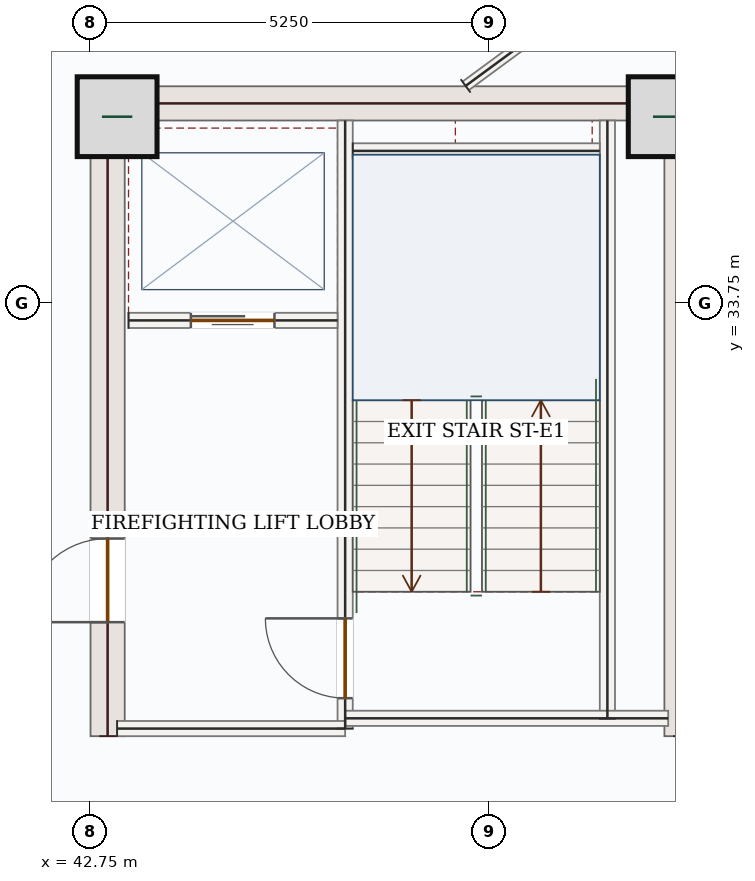
"""IFC4 building model, lengths in metres.
Left out: names, types, materials, properties, quantities, classifications, styles, units other than length and angle.
Written with IfcOpenShell. Run it as: python <this file> out.ifc"""

import sys

from ifc_helpers import new_model, si_unit, direction, frame, frame_2d, origin, origin_2d, place, context, subcontext, project, spatial, rectangle, extrude, source, transform, mapped, element, fill, save


model = new_model("IFC4")
c1 = context("Model", 3, precision=1e-05, world=origin(), true_north=direction((0.0, 1.0)))
c2 = subcontext(c1, "Body", "Model", "MODEL_VIEW")
j1 = project(units=[si_unit("LENGTHUNIT", "METRE"), si_unit("PLANEANGLEUNIT", "RADIAN")], contexts=[c1])
p1 = place(None, origin())
s1 = spatial("IfcSite", under=j1, at=p1, CompositionType="ELEMENT")
p2 = place(p1, origin())
s2 = spatial("IfcBuilding", under=s1, at=p2, CompositionType="ELEMENT")
p3 = place(p2, frame((0.0, 0.0, 276.6)))
s3 = spatial("IfcBuildingStorey", under=s2, at=p3, CompositionType="ELEMENT", Elevation=276.6)
p4 = place(p3, frame((42.975, 28.05, 0.0), z_axis=(0.0, 0.0, 1.0), x_axis=(0.0, 1.0, 0.0)))
e1 = element("IfcWall", 1, at=p4, inside=s3, PredefinedType="SHEAR", context=c2, shape_type="SweptSolid", body=[
    extrude(rectangle(XDim=8.55, YDim=0.45, at=frame_2d((4.275, 0.0))), origin(), (0.0, 0.0, 1.0), 3.5),
])
p5 = place(p4, frame((1.5, 0.0, 0.0)))
e2 = element("IfcOpeningElement", 2, at=p5, cuts=e1, PredefinedType="OPENING", context=c2, shape_type="SweptSolid", body=[
    extrude(rectangle(XDim=1.1, YDim=2.2, at=frame_2d((0.55, 1.1))), frame((0.0, 0.235, 0.0), z_axis=(0.0, -1.0, 0.0), x_axis=(1.0, 0.0, 0.0)), (0.0, 0.0, 1.0), 0.47),
])
m1 = source(origin(), c2, "Body", "SweptSolid", [
    extrude(rectangle(XDim=8.55, YDim=0.45, at=frame_2d((4.275, 0.0))), origin(), (0.0, 0.0, 1.0), 3.5),
])
p6 = place(p3, frame((50.525, 28.05, 0.0), z_axis=(0.0, 0.0, 1.0), x_axis=(0.0, 1.0, 0.0)))
e3 = element("IfcWall", 3, at=p6, inside=s3, PredefinedType="SHEAR", context=c2, shape_type="MappedRepresentation", body=[
    mapped(m1, transform((0.0, 0.0, 0.0), x_axis=(1.0, 0.0, 0.0), y_axis=(0.0, 1.0, 0.0), z_axis=(0.0, 0.0, 1.0), scale=1.0)),
])
m2 = source(origin(), c2, "Body", "SweptSolid", [
    extrude(rectangle(XDim=7.1, YDim=0.45, at=frame_2d((3.55, 0.0))), origin(), (0.0, 0.0, 1.0), 3.5),
])
p7 = place(p3, frame((43.2, 36.375, 0.0), z_axis=(0.0, 0.0, 1.0), x_axis=(1.0, 0.0, 0.0)))
e4 = element("IfcWall", 4, at=p7, inside=s3, PredefinedType="SHEAR", context=c2, shape_type="MappedRepresentation", body=[
    mapped(m2, transform((0.0, 0.0, 0.0), x_axis=(1.0, 0.0, 0.0), y_axis=(0.0, 1.0, 0.0), z_axis=(0.0, 0.0, 1.0), scale=1.0)),
])
m3 = source(origin(), c2, "Body", "SweptSolid", [
    extrude(rectangle(XDim=1.05, YDim=1.05, at=origin_2d()), origin(), (0.0, 0.0, 1.0), 3.75),
])
for number, where, z_axis, x_axis in (
    (5, (43.1, 36.2, 0.0), (0.0, 0.0, 1.0), (1.0, 0.0, 0.0)),
    (6, (50.35, 36.2, 0.0), (0.0, 0.0, 1.0), (1.0, 0.0, 0.0)),
):
    element("IfcColumn", number, at=place(p3, frame(where, z_axis=z_axis, x_axis=x_axis)), inside=s3, PredefinedType="COLUMN", context=c2, shape_type="MappedRepresentation", body=[
        mapped(m3, transform((0.0, 0.0, 0.0), x_axis=(1.0, 0.0, 0.0), y_axis=(0.0, 1.0, 0.0), z_axis=(0.0, 0.0, 1.0), scale=1.0)),
    ])
m4 = source(origin(), c2, "Body", "SweptSolid", [
    extrude(rectangle(XDim=7.87, YDim=0.2, at=frame_2d((3.935, 0.0))), origin(), (0.0, 0.0, 1.0), 3.5),
])
p8 = place(p3, frame((49.55, 28.28, 0.0), z_axis=(0.0, 0.0, 1.0), x_axis=(0.0, 1.0, 0.0)))
e7 = element("IfcWall", 7, at=p8, inside=s3, PredefinedType="SOLIDWALL", context=c2, shape_type="MappedRepresentation", body=[
    mapped(m4, transform((0.0, 0.0, 0.0), x_axis=(1.0, 0.0, 0.0), y_axis=(0.0, 1.0, 0.0), z_axis=(0.0, 0.0, 1.0), scale=1.0)),
])
p9 = place(p3, frame((46.1, 28.15, 0.0), z_axis=(0.0, 0.0, 1.0), x_axis=(0.0, 1.0, 0.0)))
e8 = element("IfcWall", 8, at=p9, inside=s3, PredefinedType="SOLIDWALL", context=c2, shape_type="SweptSolid", body=[
    extrude(rectangle(XDim=8.0, YDim=0.2, at=frame_2d((4.0, 0.0))), origin(), (0.0, 0.0, 1.0), 3.5),
])
p10 = place(p9, frame((0.4, 0.0, 0.0)))
e9 = element("IfcOpeningElement", 9, at=p10, cuts=e8, PredefinedType="OPENING", context=c2, shape_type="SweptSolid", body=[
    extrude(rectangle(XDim=1.05, YDim=2.15, at=frame_2d((0.525, 1.075))), frame((0.0, 0.11, 0.0), z_axis=(0.0, -1.0, 0.0), x_axis=(1.0, 0.0, 0.0)), (0.0, 0.0, 1.0), 0.22),
])
m5 = source(origin(), c2, "Body", "SweptSolid", [
    extrude(rectangle(XDim=3.0, YDim=0.2, at=frame_2d((1.5, 0.0))), origin(), (0.0, 0.0, 1.0), 3.5),
])
p11 = place(p3, frame((43.1, 28.15, 0.0), z_axis=(0.0, 0.0, 1.0), x_axis=(1.0, 0.0, 0.0)))
e10 = element("IfcWall", 10, at=p11, inside=s3, PredefinedType="SOLIDWALL", context=c2, shape_type="MappedRepresentation", body=[
    mapped(m5, transform((0.0, 0.0, 0.0), x_axis=(1.0, 0.0, 0.0), y_axis=(0.0, 1.0, 0.0), z_axis=(0.0, 0.0, 1.0), scale=1.0)),
])
m6 = source(origin(), c2, "Body", "SweptSolid", [
    extrude(rectangle(XDim=4.25, YDim=0.2, at=frame_2d((2.125, 0.0))), origin(), (0.0, 0.0, 1.0), 3.5),
])
p12 = place(p3, frame((46.1, 28.285, 0.0), z_axis=(0.0, 0.0, 1.0), x_axis=(1.0, 0.0, 0.0)))
e11 = element("IfcWall", 11, at=p12, inside=s3, PredefinedType="SOLIDWALL", context=c2, shape_type="MappedRepresentation", body=[
    mapped(m6, transform((0.0, 0.0, 0.0), x_axis=(1.0, 0.0, 0.0), y_axis=(0.0, 1.0, 0.0), z_axis=(0.0, 0.0, 1.0), scale=1.0)),
])
m7 = source(origin(), c2, "Body", "SweptSolid", [
    extrude(rectangle(XDim=3.25, YDim=0.2, at=frame_2d((1.625, 0.0))), origin(), (0.0, 0.0, 1.0), 3.5),
])
p13 = place(p3, frame((46.2, 35.75, 0.0), z_axis=(0.0, 0.0, 1.0), x_axis=(1.0, 0.0, 0.0)))
e12 = element("IfcWall", 12, at=p13, inside=s3, PredefinedType="SOLIDWALL", context=c2, shape_type="MappedRepresentation", body=[
    mapped(m7, transform((0.0, 0.0, 0.0), x_axis=(1.0, 0.0, 0.0), y_axis=(0.0, 1.0, 0.0), z_axis=(0.0, 0.0, 1.0), scale=1.0)),
])
p14 = place(p3, frame((43.25, 33.52, 0.0), z_axis=(0.0, 0.0, 1.0), x_axis=(1.0, 0.0, 0.0)))
e13 = element("IfcWall", 13, at=p14, inside=s3, PredefinedType="SOLIDWALL", context=c2, shape_type="SweptSolid", body=[
    extrude(rectangle(XDim=2.75, YDim=0.2, at=frame_2d((1.375, 0.0))), origin(), (0.0, 0.0, 1.0), 3.5),
])
p15 = place(p14, frame((0.82, 0.0, 0.0)))
e14 = element("IfcOpeningElement", 14, at=p15, cuts=e13, PredefinedType="OPENING", context=c2, shape_type="SweptSolid", body=[
    extrude(rectangle(XDim=1.1, YDim=2.15, at=frame_2d((0.55, 1.075))), frame((0.0, 0.11, 0.0), z_axis=(0.0, -1.0, 0.0), x_axis=(1.0, 0.0, 0.0)), (0.0, 0.0, 1.0), 0.22),
])
m8 = source(origin(), c2, "Body", "SweptSolid", [
    extrude(rectangle(XDim=5.37, YDim=0.14, at=frame_2d((2.685, 0.0))), origin(), (0.0, 0.0, 1.0), 3.5),
])
p16 = place(p3, frame((47.685, 36.605, 0.0), z_axis=(0.0, 0.0, 1.0), x_axis=(0.805412248971, 0.592715032041, 0.0)))
e15 = element("IfcWall", 15, at=p16, inside=s3, PredefinedType="PARTITIONING", context=c2, shape_type="MappedRepresentation", body=[
    mapped(m8, transform((0.0, 0.0, 0.0), x_axis=(1.0, 0.0, 0.0), y_axis=(0.0, 1.0, 0.0), z_axis=(0.0, 0.0, 1.0), scale=1.0)),
])
m9 = source(origin(), c2, "Body", "SweptSolid", [
    extrude(rectangle(XDim=1.05, YDim=2.15, at=frame_2d((0.525, 1.075))), frame((0.0, 0.025, 0.0), z_axis=(0.0, -1.0, 0.0), x_axis=(1.0, 0.0, 0.0)), (0.0, 0.0, 1.0), 0.05),
])
p17 = place(p10, origin())
e16 = element("IfcDoor", 16, at=p17, inside=s3, OperationType="SINGLE_SWING_RIGHT", PredefinedType="DOOR", context=c2, shape_type="MappedRepresentation", body=[
    mapped(m9, transform((0.0, 0.0, 0.0), x_axis=(1.0, 0.0, 0.0), y_axis=(0.0, 1.0, 0.0), z_axis=(0.0, 0.0, 1.0), scale=1.0)),
])
fill(e9, e16)
m10 = source(origin(), c2, "Body", "SweptSolid", [
    extrude(rectangle(XDim=1.1, YDim=2.15, at=frame_2d((0.55, 1.075))), frame((0.0, 0.025, 0.0), z_axis=(0.0, -1.0, 0.0), x_axis=(1.0, 0.0, 0.0)), (0.0, 0.0, 1.0), 0.05),
])
p18 = place(p15, origin())
e17 = element("IfcDoor", 17, at=p18, inside=s3, OperationType="DOUBLE_DOOR_SLIDING", PredefinedType="DOOR", context=c2, shape_type="MappedRepresentation", body=[
    mapped(m10, transform((0.0, 0.0, 0.0), x_axis=(1.0, 0.0, 0.0), y_axis=(0.0, 1.0, 0.0), z_axis=(0.0, 0.0, 1.0), scale=1.0)),
])
fill(e14, e17)
m11 = source(origin(), c2, "Body", "SweptSolid", [
    extrude(rectangle(XDim=1.1, YDim=2.2, at=frame_2d((0.55, 1.1))), frame((0.0, 0.025, 0.0), z_axis=(0.0, -1.0, 0.0), x_axis=(1.0, 0.0, 0.0)), (0.0, 0.0, 1.0), 0.05),
])
p19 = place(p5, origin())
e18 = element("IfcDoor", 18, at=p19, inside=s3, OperationType="SINGLE_SWING_LEFT", PredefinedType="DOOR", context=c2, shape_type="MappedRepresentation", body=[
    mapped(m11, transform((0.0, 0.0, 0.0), x_axis=(1.0, 0.0, 0.0), y_axis=(0.0, 1.0, 0.0), z_axis=(0.0, 0.0, 1.0), scale=1.0)),
])
fill(e2, e18)
save(model, sys.argv[1])
